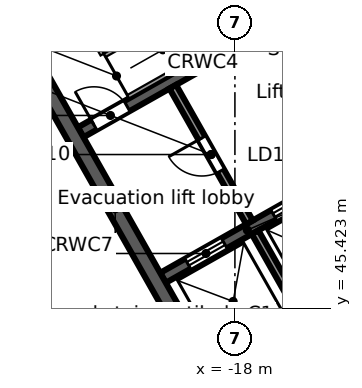
"""IFC4 building model, lengths in metres.
Left out: names, types, materials, properties, quantities, classifications, styles, units other than length and angle.
Written with IfcOpenShell. Run it as: python <this file> out.ifc"""

import sys

from ifc_helpers import new_model, si_unit, direction, frame, frame_2d, origin, place, context, subcontext, project, spatial, rectangle, extrude, element, fill, save


model = new_model("IFC4")
c1 = context("Model", 3, precision=1e-05, world=origin(), true_north=direction((0.0, 1.0)))
c2 = subcontext(c1, "Body", "Model", "MODEL_VIEW")
j1 = project(units=[si_unit("LENGTHUNIT", "METRE"), si_unit("PLANEANGLEUNIT", "RADIAN")], contexts=[c1])
p1 = place(None, origin())
s1 = spatial("IfcSite", under=j1, at=p1, CompositionType="ELEMENT")
p2 = place(p1, origin())
s2 = spatial("IfcBuilding", under=s1, at=p2, CompositionType="ELEMENT")
p3 = place(p2, frame((0.0, 0.0, 304.5)))
s3 = spatial("IfcBuildingStorey", under=s2, at=p3, CompositionType="ELEMENT", Elevation=304.5)
p4 = place(p3, frame((-58.732, 38.771, 0.0), z_axis=(0.0, 0.0, 1.0), x_axis=(0.870355615581, 0.492423702137, 0.0)))
e1 = element("IfcWall", 1, at=p4, inside=s3, PredefinedType="STANDARD", context=c2, shape_type="SweptSolid", body=[
    extrude(rectangle(XDim=64.052, YDim=0.25, at=frame_2d((32.026, 0.0))), origin(), (0.0, 0.0, 1.0), 3.52),
])
p5 = place(p4, frame((61.259, 0.0, 0.8)))
e2 = element("IfcOpeningElement", 2, at=p5, cuts=e1, PredefinedType="OPENING", context=c2, shape_type="SweptSolid", body=[
    extrude(rectangle(XDim=2.4, YDim=2.2, at=frame_2d((1.2, 1.1))), frame((0.0, 0.135, 0.0), z_axis=(0.0, -1.0, 0.0), x_axis=(1.0, 0.0, 0.0)), (0.0, 0.0, 1.0), 0.27),
])
p6 = place(p4, frame((58.216, 0.0, 0.8)))
e3 = element("IfcOpeningElement", 3, at=p6, cuts=e1, PredefinedType="OPENING", context=c2, shape_type="SweptSolid", body=[
    extrude(rectangle(XDim=2.4, YDim=2.2, at=frame_2d((1.2, 1.1))), frame((0.0, 0.135, 0.0), z_axis=(0.0, -1.0, 0.0), x_axis=(1.0, 0.0, 0.0)), (0.0, 0.0, 1.0), 0.27),
])
p7 = place(p4, frame((55.173, 0.0, 0.8)))
e4 = element("IfcOpeningElement", 4, at=p7, cuts=e1, PredefinedType="OPENING", context=c2, shape_type="SweptSolid", body=[
    extrude(rectangle(XDim=2.4, YDim=2.2, at=frame_2d((1.2, 1.1))), frame((0.0, 0.135, 0.0), z_axis=(0.0, -1.0, 0.0), x_axis=(1.0, 0.0, 0.0)), (0.0, 0.0, 1.0), 0.27),
])
p8 = place(p4, frame((52.129, 0.0, 0.8)))
e5 = element("IfcOpeningElement", 5, at=p8, cuts=e1, PredefinedType="OPENING", context=c2, shape_type="SweptSolid", body=[
    extrude(rectangle(XDim=2.4, YDim=2.2, at=frame_2d((1.2, 1.1))), frame((0.0, 0.135, 0.0), z_axis=(0.0, -1.0, 0.0), x_axis=(1.0, 0.0, 0.0)), (0.0, 0.0, 1.0), 0.27),
])
p9 = place(p4, frame((49.086, 0.0, 0.8)))
e6 = element("IfcOpeningElement", 6, at=p9, cuts=e1, PredefinedType="OPENING", context=c2, shape_type="SweptSolid", body=[
    extrude(rectangle(XDim=2.4, YDim=2.2, at=frame_2d((1.2, 1.1))), frame((0.0, 0.135, 0.0), z_axis=(0.0, -1.0, 0.0), x_axis=(1.0, 0.0, 0.0)), (0.0, 0.0, 1.0), 0.27),
])
p10 = place(p4, frame((46.043, 0.0, 0.8)))
e7 = element("IfcOpeningElement", 7, at=p10, cuts=e1, PredefinedType="OPENING", context=c2, shape_type="SweptSolid", body=[
    extrude(rectangle(XDim=2.4, YDim=2.2, at=frame_2d((1.2, 1.1))), frame((0.0, 0.135, 0.0), z_axis=(0.0, -1.0, 0.0), x_axis=(1.0, 0.0, 0.0)), (0.0, 0.0, 1.0), 0.27),
])
p11 = place(p4, frame((43.0, 0.0, 0.8)))
e8 = element("IfcOpeningElement", 8, at=p11, cuts=e1, PredefinedType="OPENING", context=c2, shape_type="SweptSolid", body=[
    extrude(rectangle(XDim=2.4, YDim=2.2, at=frame_2d((1.2, 1.1))), frame((0.0, 0.135, 0.0), z_axis=(0.0, -1.0, 0.0), x_axis=(1.0, 0.0, 0.0)), (0.0, 0.0, 1.0), 0.27),
])
p12 = place(p4, frame((39.956, 0.0, 0.8)))
e9 = element("IfcOpeningElement", 9, at=p12, cuts=e1, PredefinedType="OPENING", context=c2, shape_type="SweptSolid", body=[
    extrude(rectangle(XDim=2.4, YDim=2.2, at=frame_2d((1.2, 1.1))), frame((0.0, 0.135, 0.0), z_axis=(0.0, -1.0, 0.0), x_axis=(1.0, 0.0, 0.0)), (0.0, 0.0, 1.0), 0.27),
])
p13 = place(p4, frame((36.913, 0.0, 0.8)))
e10 = element("IfcOpeningElement", 10, at=p13, cuts=e1, PredefinedType="OPENING", context=c2, shape_type="SweptSolid", body=[
    extrude(rectangle(XDim=2.4, YDim=2.2, at=frame_2d((1.2, 1.1))), frame((0.0, 0.135, 0.0), z_axis=(0.0, -1.0, 0.0), x_axis=(1.0, 0.0, 0.0)), (0.0, 0.0, 1.0), 0.27),
])
p14 = place(p4, frame((33.87, 0.0, 0.8)))
e11 = element("IfcOpeningElement", 11, at=p14, cuts=e1, PredefinedType="OPENING", context=c2, shape_type="SweptSolid", body=[
    extrude(rectangle(XDim=2.4, YDim=2.2, at=frame_2d((1.2, 1.1))), frame((0.0, 0.135, 0.0), z_axis=(0.0, -1.0, 0.0), x_axis=(1.0, 0.0, 0.0)), (0.0, 0.0, 1.0), 0.27),
])
p15 = place(p4, frame((30.826, 0.0, 0.8)))
e12 = element("IfcOpeningElement", 12, at=p15, cuts=e1, PredefinedType="OPENING", context=c2, shape_type="SweptSolid", body=[
    extrude(rectangle(XDim=2.4, YDim=2.2, at=frame_2d((1.2, 1.1))), frame((0.0, 0.135, 0.0), z_axis=(0.0, -1.0, 0.0), x_axis=(1.0, 0.0, 0.0)), (0.0, 0.0, 1.0), 0.27),
])
p16 = place(p4, frame((27.783, 0.0, 0.8)))
e13 = element("IfcOpeningElement", 13, at=p16, cuts=e1, PredefinedType="OPENING", context=c2, shape_type="SweptSolid", body=[
    extrude(rectangle(XDim=2.4, YDim=2.2, at=frame_2d((1.2, 1.1))), frame((0.0, 0.135, 0.0), z_axis=(0.0, -1.0, 0.0), x_axis=(1.0, 0.0, 0.0)), (0.0, 0.0, 1.0), 0.27),
])
p17 = place(p4, frame((24.74, 0.0, 0.8)))
e14 = element("IfcOpeningElement", 14, at=p17, cuts=e1, PredefinedType="OPENING", context=c2, shape_type="SweptSolid", body=[
    extrude(rectangle(XDim=2.4, YDim=2.2, at=frame_2d((1.2, 1.1))), frame((0.0, 0.135, 0.0), z_axis=(0.0, -1.0, 0.0), x_axis=(1.0, 0.0, 0.0)), (0.0, 0.0, 1.0), 0.27),
])
p18 = place(p4, frame((21.696, 0.0, 0.8)))
e15 = element("IfcOpeningElement", 15, at=p18, cuts=e1, PredefinedType="OPENING", context=c2, shape_type="SweptSolid", body=[
    extrude(rectangle(XDim=2.4, YDim=2.2, at=frame_2d((1.2, 1.1))), frame((0.0, 0.135, 0.0), z_axis=(0.0, -1.0, 0.0), x_axis=(1.0, 0.0, 0.0)), (0.0, 0.0, 1.0), 0.27),
])
p19 = place(p4, frame((18.653, 0.0, 0.8)))
e16 = element("IfcOpeningElement", 16, at=p19, cuts=e1, PredefinedType="OPENING", context=c2, shape_type="SweptSolid", body=[
    extrude(rectangle(XDim=2.4, YDim=2.2, at=frame_2d((1.2, 1.1))), frame((0.0, 0.135, 0.0), z_axis=(0.0, -1.0, 0.0), x_axis=(1.0, 0.0, 0.0)), (0.0, 0.0, 1.0), 0.27),
])
p20 = place(p4, frame((15.61, 0.0, 0.8)))
e17 = element("IfcOpeningElement", 17, at=p20, cuts=e1, PredefinedType="OPENING", context=c2, shape_type="SweptSolid", body=[
    extrude(rectangle(XDim=2.4, YDim=2.2, at=frame_2d((1.2, 1.1))), frame((0.0, 0.135, 0.0), z_axis=(0.0, -1.0, 0.0), x_axis=(1.0, 0.0, 0.0)), (0.0, 0.0, 1.0), 0.27),
])
p21 = place(p4, frame((12.567, 0.0, 0.8)))
e18 = element("IfcOpeningElement", 18, at=p21, cuts=e1, PredefinedType="OPENING", context=c2, shape_type="SweptSolid", body=[
    extrude(rectangle(XDim=2.4, YDim=2.2, at=frame_2d((1.2, 1.1))), frame((0.0, 0.135, 0.0), z_axis=(0.0, -1.0, 0.0), x_axis=(1.0, 0.0, 0.0)), (0.0, 0.0, 1.0), 0.27),
])
p22 = place(p4, frame((9.523, 0.0, 0.8)))
e19 = element("IfcOpeningElement", 19, at=p22, cuts=e1, PredefinedType="OPENING", context=c2, shape_type="SweptSolid", body=[
    extrude(rectangle(XDim=2.4, YDim=2.2, at=frame_2d((1.2, 1.1))), frame((0.0, 0.135, 0.0), z_axis=(0.0, -1.0, 0.0), x_axis=(1.0, 0.0, 0.0)), (0.0, 0.0, 1.0), 0.27),
])
p23 = place(p4, frame((6.48, 0.0, 0.8)))
e20 = element("IfcOpeningElement", 20, at=p23, cuts=e1, PredefinedType="OPENING", context=c2, shape_type="SweptSolid", body=[
    extrude(rectangle(XDim=2.4, YDim=2.2, at=frame_2d((1.2, 1.1))), frame((0.0, 0.135, 0.0), z_axis=(0.0, -1.0, 0.0), x_axis=(1.0, 0.0, 0.0)), (0.0, 0.0, 1.0), 0.27),
])
p24 = place(p4, frame((3.437, 0.0, 0.8)))
e21 = element("IfcOpeningElement", 21, at=p24, cuts=e1, PredefinedType="OPENING", context=c2, shape_type="SweptSolid", body=[
    extrude(rectangle(XDim=2.4, YDim=2.2, at=frame_2d((1.2, 1.1))), frame((0.0, 0.135, 0.0), z_axis=(0.0, -1.0, 0.0), x_axis=(1.0, 0.0, 0.0)), (0.0, 0.0, 1.0), 0.27),
])
p25 = place(p4, frame((0.393, 0.0, 0.8)))
e22 = element("IfcOpeningElement", 22, at=p25, cuts=e1, PredefinedType="OPENING", context=c2, shape_type="SweptSolid", body=[
    extrude(rectangle(XDim=2.4, YDim=2.2, at=frame_2d((1.2, 1.1))), frame((0.0, 0.135, 0.0), z_axis=(0.0, -1.0, 0.0), x_axis=(1.0, 0.0, 0.0)), (0.0, 0.0, 1.0), 0.27),
])
p26 = place(p3, frame((-3.017, 46.293, 0.0), z_axis=(0.0, 0.0, 1.0), x_axis=(-0.870355474887, -0.492423950812, 0.0)))
e23 = element("IfcWall", 23, at=p26, inside=s3, PredefinedType="STANDARD", context=c2, shape_type="SweptSolid", body=[
    extrude(rectangle(XDim=40.34, YDim=0.25, at=frame_2d((20.17, 0.0))), origin(), (0.0, 0.0, 1.0), 3.52),
])
p27 = place(p26, frame((37.428, 0.0, 0.8)))
e24 = element("IfcOpeningElement", 24, at=p27, cuts=e23, PredefinedType="OPENING", context=c2, shape_type="SweptSolid", body=[
    extrude(rectangle(XDim=2.4, YDim=2.2, at=frame_2d((1.2, 1.1))), frame((0.0, 0.135, 0.0), z_axis=(0.0, -1.0, 0.0), x_axis=(1.0, 0.0, 0.0)), (0.0, 0.0, 1.0), 0.27),
])
p28 = place(p26, frame((34.372, 0.0, 0.0)))
e25 = element("IfcOpeningElement", 25, at=p28, cuts=e23, PredefinedType="OPENING", context=c2, shape_type="SweptSolid", body=[
    extrude(rectangle(XDim=1.8, YDim=2.4, at=frame_2d((0.9, 1.2))), frame((0.0, 0.135, 0.0), z_axis=(0.0, -1.0, 0.0), x_axis=(1.0, 0.0, 0.0)), (0.0, 0.0, 1.0), 0.27),
])
p29 = place(p26, frame((30.716, 0.0, 0.8)))
e26 = element("IfcOpeningElement", 26, at=p29, cuts=e23, PredefinedType="OPENING", context=c2, shape_type="SweptSolid", body=[
    extrude(rectangle(XDim=2.4, YDim=2.2, at=frame_2d((1.2, 1.1))), frame((0.0, 0.135, 0.0), z_axis=(0.0, -1.0, 0.0), x_axis=(1.0, 0.0, 0.0)), (0.0, 0.0, 1.0), 0.27),
])
p30 = place(p26, frame((27.36, 0.0, 0.8)))
e27 = element("IfcOpeningElement", 27, at=p30, cuts=e23, PredefinedType="OPENING", context=c2, shape_type="SweptSolid", body=[
    extrude(rectangle(XDim=2.4, YDim=2.2, at=frame_2d((1.2, 1.1))), frame((0.0, 0.135, 0.0), z_axis=(0.0, -1.0, 0.0), x_axis=(1.0, 0.0, 0.0)), (0.0, 0.0, 1.0), 0.27),
])
p31 = place(p26, frame((24.304, 0.0, 0.0)))
e28 = element("IfcOpeningElement", 28, at=p31, cuts=e23, PredefinedType="OPENING", context=c2, shape_type="SweptSolid", body=[
    extrude(rectangle(XDim=1.8, YDim=2.4, at=frame_2d((0.9, 1.2))), frame((0.0, 0.135, 0.0), z_axis=(0.0, -1.0, 0.0), x_axis=(1.0, 0.0, 0.0)), (0.0, 0.0, 1.0), 0.27),
])
p32 = place(p26, frame((20.648, 0.0, 0.8)))
e29 = element("IfcOpeningElement", 29, at=p32, cuts=e23, PredefinedType="OPENING", context=c2, shape_type="SweptSolid", body=[
    extrude(rectangle(XDim=2.4, YDim=2.2, at=frame_2d((1.2, 1.1))), frame((0.0, 0.135, 0.0), z_axis=(0.0, -1.0, 0.0), x_axis=(1.0, 0.0, 0.0)), (0.0, 0.0, 1.0), 0.27),
])
p33 = place(p26, frame((17.292, 0.0, 0.8)))
e30 = element("IfcOpeningElement", 30, at=p33, cuts=e23, PredefinedType="OPENING", context=c2, shape_type="SweptSolid", body=[
    extrude(rectangle(XDim=2.4, YDim=2.2, at=frame_2d((1.2, 1.1))), frame((0.0, 0.135, 0.0), z_axis=(0.0, -1.0, 0.0), x_axis=(1.0, 0.0, 0.0)), (0.0, 0.0, 1.0), 0.27),
])
p34 = place(p26, frame((14.236, 0.0, 0.0)))
e31 = element("IfcOpeningElement", 31, at=p34, cuts=e23, PredefinedType="OPENING", context=c2, shape_type="SweptSolid", body=[
    extrude(rectangle(XDim=1.8, YDim=2.4, at=frame_2d((0.9, 1.2))), frame((0.0, 0.135, 0.0), z_axis=(0.0, -1.0, 0.0), x_axis=(1.0, 0.0, 0.0)), (0.0, 0.0, 1.0), 0.27),
])
p35 = place(p26, frame((10.58, 0.0, 0.8)))
e32 = element("IfcOpeningElement", 32, at=p35, cuts=e23, PredefinedType="OPENING", context=c2, shape_type="SweptSolid", body=[
    extrude(rectangle(XDim=2.4, YDim=2.2, at=frame_2d((1.2, 1.1))), frame((0.0, 0.135, 0.0), z_axis=(0.0, -1.0, 0.0), x_axis=(1.0, 0.0, 0.0)), (0.0, 0.0, 1.0), 0.27),
])
p36 = place(p26, frame((7.224, 0.0, 0.8)))
e33 = element("IfcOpeningElement", 33, at=p36, cuts=e23, PredefinedType="OPENING", context=c2, shape_type="SweptSolid", body=[
    extrude(rectangle(XDim=2.4, YDim=2.2, at=frame_2d((1.2, 1.1))), frame((0.0, 0.135, 0.0), z_axis=(0.0, -1.0, 0.0), x_axis=(1.0, 0.0, 0.0)), (0.0, 0.0, 1.0), 0.27),
])
p37 = place(p26, frame((4.168, 0.0, 0.0)))
e34 = element("IfcOpeningElement", 34, at=p37, cuts=e23, PredefinedType="OPENING", context=c2, shape_type="SweptSolid", body=[
    extrude(rectangle(XDim=1.8, YDim=2.4, at=frame_2d((0.9, 1.2))), frame((0.0, 0.135, 0.0), z_axis=(0.0, -1.0, 0.0), x_axis=(1.0, 0.0, 0.0)), (0.0, 0.0, 1.0), 0.27),
])
p38 = place(p26, frame((0.512, 0.0, 0.8)))
e35 = element("IfcOpeningElement", 35, at=p38, cuts=e23, PredefinedType="OPENING", context=c2, shape_type="SweptSolid", body=[
    extrude(rectangle(XDim=2.4, YDim=2.2, at=frame_2d((1.2, 1.1))), frame((0.0, 0.135, 0.0), z_axis=(0.0, -1.0, 0.0), x_axis=(1.0, 0.0, 0.0)), (0.0, 0.0, 1.0), 0.27),
])
p39 = place(p3, frame((-17.975, 42.017, 0.0), z_axis=(0.0, 0.0, 1.0), x_axis=(0.87034965173, 0.492434243055, 0.0)))
e36 = element("IfcWall", 36, at=p39, inside=s3, PredefinedType="SOLIDWALL", context=c2, shape_type="SweptSolid", body=[
    extrude(rectangle(XDim=15.0, YDim=0.4, at=frame_2d((7.5, 0.0))), origin(), (0.0, 0.0, 1.0), 3.52),
])
p40 = place(p39, frame((6.1, 0.0, 0.0)))
e37 = element("IfcOpeningElement", 37, at=p40, cuts=e36, PredefinedType="OPENING", context=c2, shape_type="SweptSolid", body=[
    extrude(rectangle(XDim=1.2, YDim=2.1, at=frame_2d((0.6, 1.05))), frame((0.0, 0.21, 0.0), z_axis=(0.0, -1.0, 0.0), x_axis=(1.0, 0.0, 0.0)), (0.0, 0.0, 1.0), 0.42),
])
p41 = place(p3, frame((-19.892, 46.218, 0.0), z_axis=(0.0, 0.0, 1.0), x_axis=(0.870341639186, 0.492448404505, 0.0)))
e38 = element("IfcWall", 38, at=p41, inside=s3, PredefinedType="SOLIDWALL", context=c2, shape_type="SweptSolid", body=[
    extrude(rectangle(XDim=5.1, YDim=0.3, at=frame_2d((2.55, 0.0))), origin(), (0.0, 0.0, 1.0), 3.52),
])
p42 = place(p41, frame((0.75, 0.0, 0.0)))
e39 = element("IfcOpeningElement", 39, at=p42, cuts=e38, PredefinedType="OPENING", context=c2, shape_type="SweptSolid", body=[
    extrude(rectangle(XDim=1.1, YDim=2.1, at=frame_2d((0.55, 1.05))), frame((0.0, 0.16, 0.0), z_axis=(0.0, -1.0, 0.0), x_axis=(1.0, 0.0, 0.0)), (0.0, 0.0, 1.0), 0.32),
])
p43 = place(p41, frame((3.35, 0.0, 0.0)))
e40 = element("IfcOpeningElement", 40, at=p43, cuts=e38, PredefinedType="OPENING", context=c2, shape_type="SweptSolid", body=[
    extrude(rectangle(XDim=1.1, YDim=2.1, at=frame_2d((0.55, 1.05))), frame((0.0, 0.16, 0.0), z_axis=(0.0, -1.0, 0.0), x_axis=(1.0, 0.0, 0.0)), (0.0, 0.0, 1.0), 0.32),
])
p44 = place(p3, frame((-22.059, 50.047, 0.0), z_axis=(0.0, 0.0, 1.0), x_axis=(0.87035077051, 0.49243226567, 0.0)))
e41 = element("IfcWall", 41, at=p44, inside=s3, PredefinedType="SOLIDWALL", context=c2, shape_type="SweptSolid", body=[
    extrude(rectangle(XDim=7.4, YDim=0.3, at=frame_2d((3.7, 0.0))), origin(), (0.0, 0.0, 1.0), 3.52),
])
p45 = place(p44, frame((0.4, 0.0, 0.0)))
e42 = element("IfcOpeningElement", 42, at=p45, cuts=e41, PredefinedType="OPENING", context=c2, shape_type="SweptSolid", body=[
    extrude(rectangle(XDim=1.0, YDim=2.1, at=frame_2d((0.5, 1.05))), frame((0.0, 0.16, 0.0), z_axis=(0.0, -1.0, 0.0), x_axis=(1.0, 0.0, 0.0)), (0.0, 0.0, 1.0), 0.32),
])
p46 = place(p3, frame((-24.4, 53.779, 0.0), z_axis=(0.0, 0.0, 1.0), x_axis=(0.492421663121, -0.870356769198, 0.0)))
e43 = element("IfcWall", 43, at=p46, inside=s3, PredefinedType="SOLIDWALL", context=c2, shape_type="SweptSolid", body=[
    extrude(rectangle(XDim=13.2, YDim=0.4, at=frame_2d((6.6, 0.0))), origin(), (0.0, 0.0, 1.0), 3.52),
])
p47 = place(p3, frame((-17.469, 47.417, 0.0), z_axis=(0.0, 0.0, 1.0), x_axis=(0.492466057713, -0.870331650579, 0.0)))
e44 = element("IfcWall", 44, at=p47, inside=s3, PredefinedType="SOLIDWALL", context=c2, shape_type="SweptSolid", body=[
    extrude(rectangle(XDim=4.25, YDim=0.2, at=frame_2d((2.125, 0.0))), origin(), (0.0, 0.0, 1.0), 3.52),
])
p48 = place(p3, frame((-19.635, 51.246, 0.0), z_axis=(0.0, 0.0, 1.0), x_axis=(0.492408451753, -0.87036424366, 0.0)))
e45 = element("IfcWall", 45, at=p48, inside=s3, PredefinedType="PARTITIONING", context=c2, shape_type="SweptSolid", body=[
    extrude(rectangle(XDim=4.1, YDim=0.2, at=frame_2d((2.05, 0.0))), origin(), (0.0, 0.0, 1.0), 3.52),
])
p49 = place(p48, frame((1.55, 0.0, 0.0)))
e46 = element("IfcOpeningElement", 46, at=p49, cuts=e45, PredefinedType="OPENING", context=c2, shape_type="SweptSolid", body=[
    extrude(rectangle(XDim=1.0, YDim=2.1, at=frame_2d((0.5, 1.05))), frame((0.0, 0.11, 0.0), z_axis=(0.0, -1.0, 0.0), x_axis=(1.0, 0.0, 0.0)), (0.0, 0.0, 1.0), 0.22),
])
p50 = place(p42, origin())
e47 = element("IfcDoor", 47, at=p50, inside=s3, OperationType="DOUBLE_DOOR_SLIDING", PredefinedType="DOOR", context=c2, shape_type="SweptSolid", body=[
    extrude(rectangle(XDim=1.1, YDim=2.1, at=frame_2d((0.55, 1.05))), frame((0.0, 0.025, 0.0), z_axis=(0.0, -1.0, 0.0), x_axis=(1.0, 0.0, 0.0)), (0.0, 0.0, 1.0), 0.05),
])
fill(e39, e47)
p51 = place(p43, origin())
e48 = element("IfcDoor", 48, at=p51, inside=s3, OperationType="DOUBLE_DOOR_SLIDING", PredefinedType="DOOR", context=c2, shape_type="SweptSolid", body=[
    extrude(rectangle(XDim=1.1, YDim=2.1, at=frame_2d((0.55, 1.05))), frame((0.0, 0.025, 0.0), z_axis=(0.0, -1.0, 0.0), x_axis=(1.0, 0.0, 0.0)), (0.0, 0.0, 1.0), 0.05),
])
fill(e40, e48)
p52 = place(p45, origin())
e49 = element("IfcDoor", 49, at=p52, inside=s3, OperationType="SINGLE_SWING_LEFT", PredefinedType="DOOR", context=c2, shape_type="SweptSolid", body=[
    extrude(rectangle(XDim=1.0, YDim=2.1, at=frame_2d((0.5, 1.05))), frame((0.0, 0.025, 0.0), z_axis=(0.0, -1.0, 0.0), x_axis=(1.0, 0.0, 0.0)), (0.0, 0.0, 1.0), 0.05),
])
fill(e42, e49)
p53 = place(p49, frame((1.0, 0.0, 0.0), z_axis=(0.0, 0.0, 1.0), x_axis=(-1.0, 0.0, 0.0)))
e50 = element("IfcDoor", 50, at=p53, inside=s3, OperationType="SINGLE_SWING_RIGHT", PredefinedType="DOOR", context=c2, shape_type="SweptSolid", body=[
    extrude(rectangle(XDim=1.0, YDim=2.1, at=frame_2d((0.5, 1.05))), frame((0.0, 0.025, 0.0), z_axis=(0.0, -1.0, 0.0), x_axis=(1.0, 0.0, 0.0)), (0.0, 0.0, 1.0), 0.05),
])
fill(e46, e50)
save(model, sys.argv[1])
